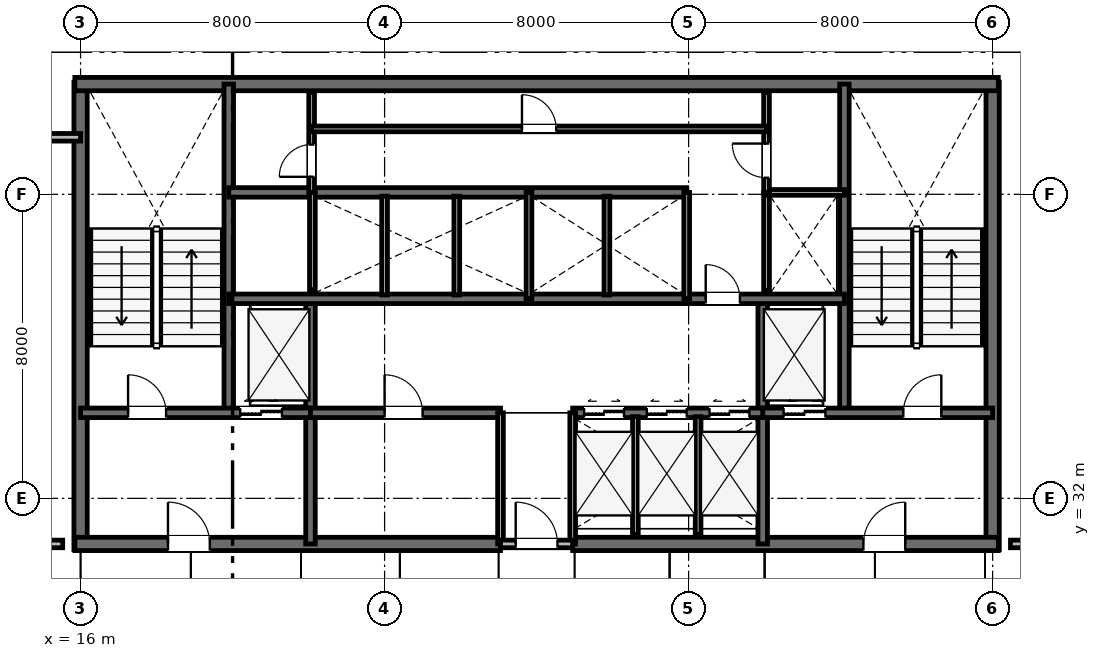
"""IFC4 building model, lengths in metres.
Left out: names, types, materials, properties, quantities, classifications, styles, units other than length and angle.
Written with IfcOpenShell. Run it as: python <this file> out.ifc"""

import sys

from ifc_helpers import new_model, si_unit, direction, frame, frame_2d, origin, place, context, subcontext, project, spatial, rectangle, extrude, element, fill, save


model = new_model("IFC4")
c1 = context("Model", 3, precision=1e-05, world=origin(), true_north=direction((0.0, 1.0)))
c2 = subcontext(c1, "Body", "Model", "MODEL_VIEW")
j1 = project(units=[si_unit("LENGTHUNIT", "METRE"), si_unit("PLANEANGLEUNIT", "RADIAN")], contexts=[c1])
p1 = place(None, origin())
s1 = spatial("IfcSite", under=j1, at=p1, CompositionType="ELEMENT")
p2 = place(p1, origin())
s2 = spatial("IfcBuilding", under=s1, at=p2, CompositionType="ELEMENT")
p3 = place(p2, frame((0.0, 0.0, 126.0)))
s3 = spatial("IfcBuildingStorey", under=s2, at=p3, CompositionType="ELEMENT", Elevation=126.0)
for number, where, z_axis, x_axis in (
    (1, (16.0, 30.65, 0.0), (0.0, 0.0, 1.0), (0.0, 1.0, 0.0)),
    (2, (40.0, 30.65, 0.0), (0.0, 0.0, 1.0), (0.0, 1.0, 0.0)),
):
    element("IfcWall", number, at=place(p3, frame(where, z_axis=z_axis, x_axis=x_axis)), inside=s3, PredefinedType="SHEAR", context=c2, shape_type="SweptSolid", body=[
        extrude(rectangle(XDim=12.3, YDim=0.35, at=frame_2d((6.15, 0.0))), origin(), (0.0, 0.0, 1.0), 3.6),
    ])
p4 = place(p3, frame((15.85, 42.9, 0.0), z_axis=(0.0, 0.0, 1.0), x_axis=(1.0, 0.0, 0.0)))
e3 = element("IfcWall", 3, at=p4, inside=s3, PredefinedType="SHEAR", context=c2, shape_type="SweptSolid", body=[
    extrude(rectangle(XDim=24.3, YDim=0.35, at=frame_2d((12.15, 0.0))), origin(), (0.0, 0.0, 1.0), 3.6),
])
p5 = place(p3, frame((15.85, 30.8, 0.0), z_axis=(0.0, 0.0, 1.0), x_axis=(1.0, 0.0, 0.0)))
e4 = element("IfcWall", 4, at=p5, inside=s3, PredefinedType="SHEAR", context=c2, shape_type="SweptSolid", body=[
    extrude(rectangle(XDim=11.2, YDim=0.35, at=frame_2d((5.6, 0.0))), origin(), (0.0, 0.0, 1.0), 3.6),
])
p6 = place(p5, frame((2.45, 0.0, 0.0)))
e5 = element("IfcOpeningElement", 5, at=p6, cuts=e4, PredefinedType="OPENING", context=c2, shape_type="SweptSolid", body=[
    extrude(rectangle(XDim=1.1, YDim=2.15, at=frame_2d((0.55, 1.075))), frame((0.0, 0.185, 0.0), z_axis=(0.0, -1.0, 0.0), x_axis=(1.0, 0.0, 0.0)), (0.0, 0.0, 1.0), 0.37),
])
p7 = place(p3, frame((28.95, 30.8, 0.0), z_axis=(0.0, 0.0, 1.0), x_axis=(1.0, 0.0, 0.0)))
e6 = element("IfcWall", 6, at=p7, inside=s3, PredefinedType="SHEAR", context=c2, shape_type="SweptSolid", body=[
    extrude(rectangle(XDim=11.2, YDim=0.35, at=frame_2d((5.6, 0.0))), origin(), (0.0, 0.0, 1.0), 3.6),
])
p8 = place(p7, frame((7.65, 0.0, 0.0)))
e7 = element("IfcOpeningElement", 7, at=p8, cuts=e6, PredefinedType="OPENING", context=c2, shape_type="SweptSolid", body=[
    extrude(rectangle(XDim=1.1, YDim=2.15, at=frame_2d((0.55, 1.075))), frame((0.0, 0.185, 0.0), z_axis=(0.0, -1.0, 0.0), x_axis=(1.0, 0.0, 0.0)), (0.0, 0.0, 1.0), 0.37),
])
for number, where, z_axis, x_axis in (
    (8, (19.9, 34.25, 0.0), (0.0, 0.0, 1.0), (0.0, 1.0, 0.0)),
    (9, (36.1, 34.25, 0.0), (0.0, 0.0, 1.0), (0.0, 1.0, 0.0)),
):
    element("IfcWall", number, at=place(p3, frame(where, z_axis=z_axis, x_axis=x_axis)), inside=s3, PredefinedType="SHEAR", context=c2, shape_type="SweptSolid", body=[
        extrude(rectangle(XDim=8.65, YDim=0.25, at=frame_2d((4.325, 0.0))), origin(), (0.0, 0.0, 1.0), 3.6),
    ])
for number, where, z_axis, x_axis in (
    (10, (22.05, 30.8, 0.0), (0.0, 0.0, 1.0), (0.0, 1.0, 0.0)),
    (11, (33.95, 30.8, 0.0), (0.0, 0.0, 1.0), (0.0, 1.0, 0.0)),
):
    element("IfcWall", number, at=place(p3, frame(where, z_axis=z_axis, x_axis=x_axis)), inside=s3, PredefinedType="SHEAR", context=c2, shape_type="SweptSolid", body=[
        extrude(rectangle(XDim=6.45, YDim=0.25, at=frame_2d((3.225, 0.0))), origin(), (0.0, 0.0, 1.0), 3.6),
    ])
p9 = place(p3, frame((16.0, 34.25, 0.0), z_axis=(0.0, 0.0, 1.0), x_axis=(1.0, 0.0, 0.0)))
e12 = element("IfcWall", 12, at=p9, inside=s3, PredefinedType="SHEAR", context=c2, shape_type="SweptSolid", body=[
    extrude(rectangle(XDim=6.05, YDim=0.25, at=frame_2d((3.025, 0.0))), origin(), (0.0, 0.0, 1.0), 3.6),
])
p10 = place(p9, frame((1.25, 0.0, 0.0)))
e13 = element("IfcOpeningElement", 13, at=p10, cuts=e12, PredefinedType="OPENING", context=c2, shape_type="SweptSolid", body=[
    extrude(rectangle(XDim=1.0, YDim=2.15, at=frame_2d((0.5, 1.075))), frame((0.0, 0.135, 0.0), z_axis=(0.0, -1.0, 0.0), x_axis=(1.0, 0.0, 0.0)), (0.0, 0.0, 1.0), 0.27),
])
p11 = place(p9, frame((4.2, 0.0, 0.0)))
e14 = element("IfcOpeningElement", 14, at=p11, cuts=e12, PredefinedType="OPENING", context=c2, shape_type="SweptSolid", body=[
    extrude(rectangle(XDim=1.1, YDim=2.15, at=frame_2d((0.55, 1.075))), frame((0.0, 0.135, 0.0), z_axis=(0.0, -1.0, 0.0), x_axis=(1.0, 0.0, 0.0)), (0.0, 0.0, 1.0), 0.27),
])
p12 = place(p3, frame((33.95, 34.25, 0.0), z_axis=(0.0, 0.0, 1.0), x_axis=(1.0, 0.0, 0.0)))
e15 = element("IfcWall", 15, at=p12, inside=s3, PredefinedType="SHEAR", context=c2, shape_type="SweptSolid", body=[
    extrude(rectangle(XDim=6.05, YDim=0.25, at=frame_2d((3.025, 0.0))), origin(), (0.0, 0.0, 1.0), 3.6),
])
p13 = place(p12, frame((3.7, 0.0, 0.0)))
e16 = element("IfcOpeningElement", 16, at=p13, cuts=e15, PredefinedType="OPENING", context=c2, shape_type="SweptSolid", body=[
    extrude(rectangle(XDim=1.0, YDim=2.15, at=frame_2d((0.5, 1.075))), frame((0.0, 0.135, 0.0), z_axis=(0.0, -1.0, 0.0), x_axis=(1.0, 0.0, 0.0)), (0.0, 0.0, 1.0), 0.27),
])
p14 = place(p12, frame((0.55, 0.0, 0.0)))
e17 = element("IfcOpeningElement", 17, at=p14, cuts=e15, PredefinedType="OPENING", context=c2, shape_type="SweptSolid", body=[
    extrude(rectangle(XDim=1.1, YDim=2.15, at=frame_2d((0.55, 1.075))), frame((0.0, 0.135, 0.0), z_axis=(0.0, -1.0, 0.0), x_axis=(1.0, 0.0, 0.0)), (0.0, 0.0, 1.0), 0.27),
])
p15 = place(p3, frame((22.05, 34.25, 0.0), z_axis=(0.0, 0.0, 1.0), x_axis=(1.0, 0.0, 0.0)))
e18 = element("IfcWall", 18, at=p15, inside=s3, PredefinedType="SHEAR", context=c2, shape_type="SweptSolid", body=[
    extrude(rectangle(XDim=5.0, YDim=0.25, at=frame_2d((2.5, 0.0))), origin(), (0.0, 0.0, 1.0), 3.6),
])
p16 = place(p15, frame((1.95, 0.0, 0.0)))
e19 = element("IfcOpeningElement", 19, at=p16, cuts=e18, PredefinedType="OPENING", context=c2, shape_type="SweptSolid", body=[
    extrude(rectangle(XDim=1.0, YDim=2.15, at=frame_2d((0.5, 1.075))), frame((0.0, 0.135, 0.0), z_axis=(0.0, -1.0, 0.0), x_axis=(1.0, 0.0, 0.0)), (0.0, 0.0, 1.0), 0.27),
])
p17 = place(p3, frame((28.95, 34.25, 0.0), z_axis=(0.0, 0.0, 1.0), x_axis=(1.0, 0.0, 0.0)))
e20 = element("IfcWall", 20, at=p17, inside=s3, PredefinedType="SHEAR", context=c2, shape_type="SweptSolid", body=[
    extrude(rectangle(XDim=5.0, YDim=0.25, at=frame_2d((2.5, 0.0))), origin(), (0.0, 0.0, 1.0), 3.6),
])
p18 = place(p17, frame((0.3, 0.0, 0.0)))
e21 = element("IfcOpeningElement", 21, at=p18, cuts=e20, PredefinedType="OPENING", context=c2, shape_type="SweptSolid", body=[
    extrude(rectangle(XDim=1.05, YDim=2.15, at=frame_2d((0.525, 1.075))), frame((0.0, 0.135, 0.0), z_axis=(0.0, -1.0, 0.0), x_axis=(1.0, 0.0, 0.0)), (0.0, 0.0, 1.0), 0.27),
])
p19 = place(p17, frame((1.95, 0.0, 0.0)))
e22 = element("IfcOpeningElement", 22, at=p19, cuts=e20, PredefinedType="OPENING", context=c2, shape_type="SweptSolid", body=[
    extrude(rectangle(XDim=1.05, YDim=2.15, at=frame_2d((0.525, 1.075))), frame((0.0, 0.135, 0.0), z_axis=(0.0, -1.0, 0.0), x_axis=(1.0, 0.0, 0.0)), (0.0, 0.0, 1.0), 0.27),
])
p20 = place(p17, frame((3.6, 0.0, 0.0)))
e23 = element("IfcOpeningElement", 23, at=p20, cuts=e20, PredefinedType="OPENING", context=c2, shape_type="SweptSolid", body=[
    extrude(rectangle(XDim=1.05, YDim=2.15, at=frame_2d((0.525, 1.075))), frame((0.0, 0.135, 0.0), z_axis=(0.0, -1.0, 0.0), x_axis=(1.0, 0.0, 0.0)), (0.0, 0.0, 1.0), 0.27),
])
p21 = place(p3, frame((19.9, 37.25, 0.0), z_axis=(0.0, 0.0, 1.0), x_axis=(1.0, 0.0, 0.0)))
e24 = element("IfcWall", 24, at=p21, inside=s3, PredefinedType="SHEAR", context=c2, shape_type="SweptSolid", body=[
    extrude(rectangle(XDim=16.2, YDim=0.25, at=frame_2d((8.1, 0.0))), origin(), (0.0, 0.0, 1.0), 3.6),
])
p22 = place(p21, frame((12.55, 0.0, 0.0)))
e25 = element("IfcOpeningElement", 25, at=p22, cuts=e24, PredefinedType="OPENING", context=c2, shape_type="SweptSolid", body=[
    extrude(rectangle(XDim=0.9, YDim=2.15, at=frame_2d((0.45, 1.075))), frame((0.0, 0.135, 0.0), z_axis=(0.0, -1.0, 0.0), x_axis=(1.0, 0.0, 0.0)), (0.0, 0.0, 1.0), 0.27),
])
p23 = place(p3, frame((19.9, 40.05, 0.0), z_axis=(0.0, 0.0, 1.0), x_axis=(1.0, 0.0, 0.0)))
e26 = element("IfcWall", 26, at=p23, inside=s3, PredefinedType="SHEAR", context=c2, shape_type="SweptSolid", body=[
    extrude(rectangle(XDim=12.05, YDim=0.25, at=frame_2d((6.025, 0.0))), origin(), (0.0, 0.0, 1.0), 3.6),
])
p24 = place(p3, frame((27.05, 30.8, 0.0), z_axis=(0.0, 0.0, 1.0), x_axis=(0.0, 1.0, 0.0)))
e27 = element("IfcWall", 27, at=p24, inside=s3, PredefinedType="PLUMBINGWALL", context=c2, shape_type="SweptSolid", body=[
    extrude(rectangle(XDim=3.45, YDim=0.15, at=frame_2d((1.725, 0.0))), origin(), (0.0, 0.0, 1.0), 3.01),
])
p25 = place(p3, frame((28.95, 30.8, 0.0), z_axis=(0.0, 0.0, 1.0), x_axis=(0.0, 1.0, 0.0)))
e28 = element("IfcWall", 28, at=p25, inside=s3, PredefinedType="PLUMBINGWALL", context=c2, shape_type="SweptSolid", body=[
    extrude(rectangle(XDim=3.45, YDim=0.15, at=frame_2d((1.725, 0.0))), origin(), (0.0, 0.0, 1.0), 3.33),
])
p26 = place(p3, frame((27.05, 30.8, 0.0), z_axis=(0.0, 0.0, 1.0), x_axis=(1.0, 0.0, 0.0)))
e29 = element("IfcWall", 29, at=p26, inside=s3, PredefinedType="PARTITIONING", context=c2, shape_type="SweptSolid", body=[
    extrude(rectangle(XDim=1.9, YDim=0.2, at=frame_2d((0.95, 0.0))), origin(), (0.0, 0.0, 1.0), 3.01),
])
p27 = place(p26, frame((0.4, 0.0, 0.0)))
e30 = element("IfcOpeningElement", 30, at=p27, cuts=e29, PredefinedType="OPENING", context=c2, shape_type="SweptSolid", body=[
    extrude(rectangle(XDim=1.1, YDim=2.15, at=frame_2d((0.55, 1.075))), frame((0.0, 0.11, 0.0), z_axis=(0.0, -1.0, 0.0), x_axis=(1.0, 0.0, 0.0)), (0.0, 0.0, 1.0), 0.22),
])
for number, where, z_axis, x_axis in (
    (31, (30.6, 31.05, 0.0), (0.0, 0.0, 1.0), (0.0, 1.0, 0.0)),
    (32, (32.25, 31.05, 0.0), (0.0, 0.0, 1.0), (0.0, 1.0, 0.0)),
):
    element("IfcWall", number, at=place(p3, frame(where, z_axis=z_axis, x_axis=x_axis)), inside=s3, PredefinedType="PLUMBINGWALL", context=c2, shape_type="SweptSolid", body=[
        extrude(rectangle(XDim=3.1, YDim=0.15, at=frame_2d((1.55, 0.0))), origin(), (0.0, 0.0, 1.0), 3.33),
    ])
p28 = place(p3, frame((22.1, 37.49, 0.0), z_axis=(0.0, 0.0, 1.0), x_axis=(0.0, 1.0, 0.0)))
e33 = element("IfcWall", 33, at=p28, inside=s3, PredefinedType="PLUMBINGWALL", context=c2, shape_type="SweptSolid", body=[
    extrude(rectangle(XDim=2.56, YDim=0.15, at=frame_2d((1.28, 0.0))), origin(), (0.0, 0.0, 1.0), 3.33),
])
p29 = place(p3, frame((27.8, 37.25, 0.0), z_axis=(0.0, 0.0, 1.0), x_axis=(0.0, 1.0, 0.0)))
e34 = element("IfcWall", 34, at=p29, inside=s3, PredefinedType="PLUMBINGWALL", context=c2, shape_type="SweptSolid", body=[
    extrude(rectangle(XDim=2.8, YDim=0.15, at=frame_2d((1.4, 0.0))), origin(), (0.0, 0.0, 1.0), 3.33),
])
for number, where, z_axis, x_axis in (
    (35, (24.0, 37.35, 0.0), (0.0, 0.0, 1.0), (0.0, 1.0, 0.0)),
    (36, (25.9, 37.35, 0.0), (0.0, 0.0, 1.0), (0.0, 1.0, 0.0)),
):
    element("IfcWall", number, at=place(p3, frame(where, z_axis=z_axis, x_axis=x_axis)), inside=s3, PredefinedType="PLUMBINGWALL", context=c2, shape_type="SweptSolid", body=[
        extrude(rectangle(XDim=2.6, YDim=0.15, at=frame_2d((1.3, 0.0))), origin(), (0.0, 0.0, 1.0), 3.33),
    ])
p30 = place(p3, frame((31.95, 37.25, 0.0), z_axis=(0.0, 0.0, 1.0), x_axis=(0.0, 1.0, 0.0)))
e37 = element("IfcWall", 37, at=p30, inside=s3, PredefinedType="PLUMBINGWALL", context=c2, shape_type="SweptSolid", body=[
    extrude(rectangle(XDim=2.8, YDim=0.15, at=frame_2d((1.4, 0.0))), origin(), (0.0, 0.0, 1.0), 3.33),
])
p31 = place(p3, frame((29.85, 37.35, 0.0), z_axis=(0.0, 0.0, 1.0), x_axis=(0.0, 1.0, 0.0)))
e38 = element("IfcWall", 38, at=p31, inside=s3, PredefinedType="PLUMBINGWALL", context=c2, shape_type="SweptSolid", body=[
    extrude(rectangle(XDim=2.6, YDim=0.15, at=frame_2d((1.3, 0.0))), origin(), (0.0, 0.0, 1.0), 3.33),
])
p32 = place(p3, frame((34.05, 37.473, 0.0), z_axis=(0.0, 0.0, 1.0), x_axis=(0.0, 1.0, 0.0)))
e39 = element("IfcWall", 39, at=p32, inside=s3, PredefinedType="PLUMBINGWALL", context=c2, shape_type="SweptSolid", body=[
    extrude(rectangle(XDim=2.577, YDim=0.15, at=frame_2d((1.288, 0.0))), origin(), (0.0, 0.0, 1.0), 3.33),
])
p33 = place(p3, frame((34.05, 40.05, 0.0), z_axis=(0.0, 0.0, 1.0), x_axis=(1.0, 0.0, 0.0)))
e40 = element("IfcWall", 40, at=p33, inside=s3, PredefinedType="PARTITIONING", context=c2, shape_type="SweptSolid", body=[
    extrude(rectangle(XDim=2.05, YDim=0.15, at=frame_2d((1.025, 0.0))), origin(), (0.0, 0.0, 1.0), 3.33),
])
p34 = place(p3, frame((34.05, 40.05, 0.0), z_axis=(0.0, 0.0, 1.0), x_axis=(0.0, 1.0, 0.0)))
e41 = element("IfcWall", 41, at=p34, inside=s3, PredefinedType="PARTITIONING", context=c2, shape_type="SweptSolid", body=[
    extrude(rectangle(XDim=2.63, YDim=0.15, at=frame_2d((1.315, 0.0))), origin(), (0.0, 0.0, 1.0), 3.33),
])
p35 = place(p34, frame((0.385, 0.0, 0.0)))
e42 = element("IfcOpeningElement", 42, at=p35, cuts=e41, PredefinedType="OPENING", context=c2, shape_type="SweptSolid", body=[
    extrude(rectangle(XDim=0.9, YDim=2.15, at=frame_2d((0.45, 1.075))), frame((0.0, 0.085, 0.0), z_axis=(0.0, -1.0, 0.0), x_axis=(1.0, 0.0, 0.0)), (0.0, 0.0, 1.0), 0.17),
])
p36 = place(p3, frame((22.08, 40.05, 0.0), z_axis=(0.0, 0.0, 1.0), x_axis=(0.0, 1.0, 0.0)))
e43 = element("IfcWall", 43, at=p36, inside=s3, PredefinedType="PARTITIONING", context=c2, shape_type="SweptSolid", body=[
    extrude(rectangle(XDim=2.63, YDim=0.15, at=frame_2d((1.315, 0.0))), origin(), (0.0, 0.0, 1.0), 3.33),
])
p37 = place(p36, frame((0.41, 0.0, 0.0)))
e44 = element("IfcOpeningElement", 44, at=p37, cuts=e43, PredefinedType="OPENING", context=c2, shape_type="SweptSolid", body=[
    extrude(rectangle(XDim=0.85, YDim=2.15, at=frame_2d((0.425, 1.075))), frame((0.0, 0.085, 0.0), z_axis=(0.0, -1.0, 0.0), x_axis=(1.0, 0.0, 0.0)), (0.0, 0.0, 1.0), 0.17),
])
p38 = place(p3, frame((22.08, 41.72, 0.0), z_axis=(0.0, 0.0, 1.0), x_axis=(1.0, 0.0, 0.0)))
e45 = element("IfcWall", 45, at=p38, inside=s3, PredefinedType="PARTITIONING", context=c2, shape_type="SweptSolid", body=[
    extrude(rectangle(XDim=11.97, YDim=0.15, at=frame_2d((5.985, 0.0))), origin(), (0.0, 0.0, 1.0), 3.33),
])
p39 = place(p38, frame((5.535, 0.0, 0.0)))
e46 = element("IfcOpeningElement", 46, at=p39, cuts=e45, PredefinedType="OPENING", context=c2, shape_type="SweptSolid", body=[
    extrude(rectangle(XDim=0.9, YDim=2.15, at=frame_2d((0.45, 1.075))), frame((0.0, 0.085, 0.0), z_axis=(0.0, -1.0, 0.0), x_axis=(1.0, 0.0, 0.0)), (0.0, 0.0, 1.0), 0.17),
])
p40 = place(p3, frame((11.4, 30.8, 0.0), z_axis=(0.0, 0.0, 1.0), x_axis=(1.0, 0.0, 0.0)))
e47 = element("IfcWall", 47, at=p40, inside=s3, PredefinedType="PARTITIONING", context=c2, shape_type="SweptSolid", body=[
    extrude(rectangle(XDim=4.13, YDim=0.2, at=frame_2d((2.065, 0.0))), origin(), (0.0, 0.0, 1.0), 2.87),
])
p41 = place(p3, frame((40.47, 30.8, 0.0), z_axis=(0.0, 0.0, 1.0), x_axis=(1.0, 0.0, 0.0)))
e48 = element("IfcWall", 48, at=p41, inside=s3, PredefinedType="PARTITIONING", context=c2, shape_type="SweptSolid", body=[
    extrude(rectangle(XDim=1.73, YDim=0.2, at=frame_2d((0.865, 0.0))), origin(), (0.0, 0.0, 1.0), 2.87),
])
p42 = place(p3, frame((0.1, 41.5, 0.0), z_axis=(0.0, 0.0, 1.0), x_axis=(1.0, 0.0, 0.0)))
e49 = element("IfcWall", 49, at=p42, inside=s3, PredefinedType="PARTITIONING", context=c2, shape_type="SweptSolid", body=[
    extrude(rectangle(XDim=15.9, YDim=0.2, at=frame_2d((7.95, 0.0))), origin(), (0.0, 0.0, 1.0), 2.87),
])
p43 = place(p42, frame((9.877, 0.0, 0.0)))
e50 = element("IfcOpeningElement", 50, at=p43, cuts=e49, PredefinedType="OPENING", context=c2, shape_type="SweptSolid", body=[
    extrude(rectangle(XDim=0.95, YDim=2.15, at=frame_2d((0.475, 1.075))), frame((0.0, 0.11, 0.0), z_axis=(0.0, -1.0, 0.0), x_axis=(1.0, 0.0, 0.0)), (0.0, 0.0, 1.0), 0.22),
])
p44 = place(p27, origin())
e51 = element("IfcDoor", 51, at=p44, inside=s3, OperationType="SINGLE_SWING_LEFT", PredefinedType="DOOR", context=c2, shape_type="SweptSolid", body=[
    extrude(rectangle(XDim=1.1, YDim=2.15, at=frame_2d((0.55, 1.075))), frame((0.0, 0.025, 0.0), z_axis=(0.0, -1.0, 0.0), x_axis=(1.0, 0.0, 0.0)), (0.0, 0.0, 1.0), 0.05),
])
fill(e30, e51)
p45 = place(p10, origin())
e52 = element("IfcDoor", 52, at=p45, inside=s3, OperationType="SINGLE_SWING_LEFT", PredefinedType="DOOR", context=c2, shape_type="SweptSolid", body=[
    extrude(rectangle(XDim=1.0, YDim=2.15, at=frame_2d((0.5, 1.075))), frame((0.0, 0.025, 0.0), z_axis=(0.0, -1.0, 0.0), x_axis=(1.0, 0.0, 0.0)), (0.0, 0.0, 1.0), 0.05),
])
fill(e13, e52)
p46 = place(p13, origin())
e53 = element("IfcDoor", 53, at=p46, inside=s3, OperationType="SINGLE_SWING_RIGHT", PredefinedType="DOOR", context=c2, shape_type="SweptSolid", body=[
    extrude(rectangle(XDim=1.0, YDim=2.15, at=frame_2d((0.5, 1.075))), frame((0.0, 0.025, 0.0), z_axis=(0.0, -1.0, 0.0), x_axis=(1.0, 0.0, 0.0)), (0.0, 0.0, 1.0), 0.05),
])
fill(e16, e53)
p47 = place(p6, origin())
e54 = element("IfcDoor", 54, at=p47, inside=s3, OperationType="SINGLE_SWING_LEFT", PredefinedType="DOOR", context=c2, shape_type="SweptSolid", body=[
    extrude(rectangle(XDim=1.1, YDim=2.15, at=frame_2d((0.55, 1.075))), frame((0.0, 0.025, 0.0), z_axis=(0.0, -1.0, 0.0), x_axis=(1.0, 0.0, 0.0)), (0.0, 0.0, 1.0), 0.05),
])
fill(e5, e54)
p48 = place(p8, origin())
e55 = element("IfcDoor", 55, at=p48, inside=s3, OperationType="SINGLE_SWING_RIGHT", PredefinedType="DOOR", context=c2, shape_type="SweptSolid", body=[
    extrude(rectangle(XDim=1.1, YDim=2.15, at=frame_2d((0.55, 1.075))), frame((0.0, 0.025, 0.0), z_axis=(0.0, -1.0, 0.0), x_axis=(1.0, 0.0, 0.0)), (0.0, 0.0, 1.0), 0.05),
])
fill(e7, e55)
p49 = place(p16, origin())
e56 = element("IfcDoor", 56, at=p49, inside=s3, OperationType="SINGLE_SWING_LEFT", PredefinedType="DOOR", context=c2, shape_type="SweptSolid", body=[
    extrude(rectangle(XDim=1.0, YDim=2.15, at=frame_2d((0.5, 1.075))), frame((0.0, 0.025, 0.0), z_axis=(0.0, -1.0, 0.0), x_axis=(1.0, 0.0, 0.0)), (0.0, 0.0, 1.0), 0.05),
])
fill(e19, e56)
p50 = place(p22, origin())
e57 = element("IfcDoor", 57, at=p50, inside=s3, OperationType="SINGLE_SWING_LEFT", PredefinedType="DOOR", context=c2, shape_type="SweptSolid", body=[
    extrude(rectangle(XDim=0.9, YDim=2.15, at=frame_2d((0.45, 1.075))), frame((0.0, 0.025, 0.0), z_axis=(0.0, -1.0, 0.0), x_axis=(1.0, 0.0, 0.0)), (0.0, 0.0, 1.0), 0.05),
])
fill(e25, e57)
p51 = place(p35, origin())
e58 = element("IfcDoor", 58, at=p51, inside=s3, OperationType="SINGLE_SWING_RIGHT", PredefinedType="DOOR", context=c2, shape_type="SweptSolid", body=[
    extrude(rectangle(XDim=0.9, YDim=2.15, at=frame_2d((0.45, 1.075))), frame((0.0, 0.025, 0.0), z_axis=(0.0, -1.0, 0.0), x_axis=(1.0, 0.0, 0.0)), (0.0, 0.0, 1.0), 0.05),
])
fill(e42, e58)
p52 = place(p37, origin())
e59 = element("IfcDoor", 59, at=p52, inside=s3, OperationType="SINGLE_SWING_LEFT", PredefinedType="DOOR", context=c2, shape_type="SweptSolid", body=[
    extrude(rectangle(XDim=0.85, YDim=2.15, at=frame_2d((0.425, 1.075))), frame((0.0, 0.025, 0.0), z_axis=(0.0, -1.0, 0.0), x_axis=(1.0, 0.0, 0.0)), (0.0, 0.0, 1.0), 0.05),
])
fill(e44, e59)
p53 = place(p39, origin())
e60 = element("IfcDoor", 60, at=p53, inside=s3, OperationType="SINGLE_SWING_LEFT", PredefinedType="DOOR", context=c2, shape_type="SweptSolid", body=[
    extrude(rectangle(XDim=0.9, YDim=2.15, at=frame_2d((0.45, 1.075))), frame((0.0, 0.025, 0.0), z_axis=(0.0, -1.0, 0.0), x_axis=(1.0, 0.0, 0.0)), (0.0, 0.0, 1.0), 0.05),
])
fill(e46, e60)
p54 = place(p11, origin())
e61 = element("IfcDoor", 61, at=p54, inside=s3, OperationType="DOUBLE_DOOR_SLIDING", PredefinedType="DOOR", context=c2, shape_type="SweptSolid", body=[
    extrude(rectangle(XDim=1.1, YDim=2.15, at=frame_2d((0.55, 1.075))), frame((0.0, 0.025, 0.0), z_axis=(0.0, -1.0, 0.0), x_axis=(1.0, 0.0, 0.0)), (0.0, 0.0, 1.0), 0.05),
])
fill(e14, e61)
p55 = place(p14, origin())
e62 = element("IfcDoor", 62, at=p55, inside=s3, OperationType="DOUBLE_DOOR_SLIDING", PredefinedType="DOOR", context=c2, shape_type="SweptSolid", body=[
    extrude(rectangle(XDim=1.1, YDim=2.15, at=frame_2d((0.55, 1.075))), frame((0.0, 0.025, 0.0), z_axis=(0.0, -1.0, 0.0), x_axis=(1.0, 0.0, 0.0)), (0.0, 0.0, 1.0), 0.05),
])
fill(e17, e62)
p56 = place(p18, origin())
e63 = element("IfcDoor", 63, at=p56, inside=s3, OperationType="DOUBLE_DOOR_SLIDING", PredefinedType="DOOR", context=c2, shape_type="SweptSolid", body=[
    extrude(rectangle(XDim=1.05, YDim=2.15, at=frame_2d((0.525, 1.075))), frame((0.0, 0.025, 0.0), z_axis=(0.0, -1.0, 0.0), x_axis=(1.0, 0.0, 0.0)), (0.0, 0.0, 1.0), 0.05),
])
fill(e21, e63)
p57 = place(p19, origin())
e64 = element("IfcDoor", 64, at=p57, inside=s3, OperationType="DOUBLE_DOOR_SLIDING", PredefinedType="DOOR", context=c2, shape_type="SweptSolid", body=[
    extrude(rectangle(XDim=1.05, YDim=2.15, at=frame_2d((0.525, 1.075))), frame((0.0, 0.025, 0.0), z_axis=(0.0, -1.0, 0.0), x_axis=(1.0, 0.0, 0.0)), (0.0, 0.0, 1.0), 0.05),
])
fill(e22, e64)
p58 = place(p20, origin())
e65 = element("IfcDoor", 65, at=p58, inside=s3, OperationType="DOUBLE_DOOR_SLIDING", PredefinedType="DOOR", context=c2, shape_type="SweptSolid", body=[
    extrude(rectangle(XDim=1.05, YDim=2.15, at=frame_2d((0.525, 1.075))), frame((0.0, 0.025, 0.0), z_axis=(0.0, -1.0, 0.0), x_axis=(1.0, 0.0, 0.0)), (0.0, 0.0, 1.0), 0.05),
])
fill(e23, e65)
save(model, sys.argv[1])
